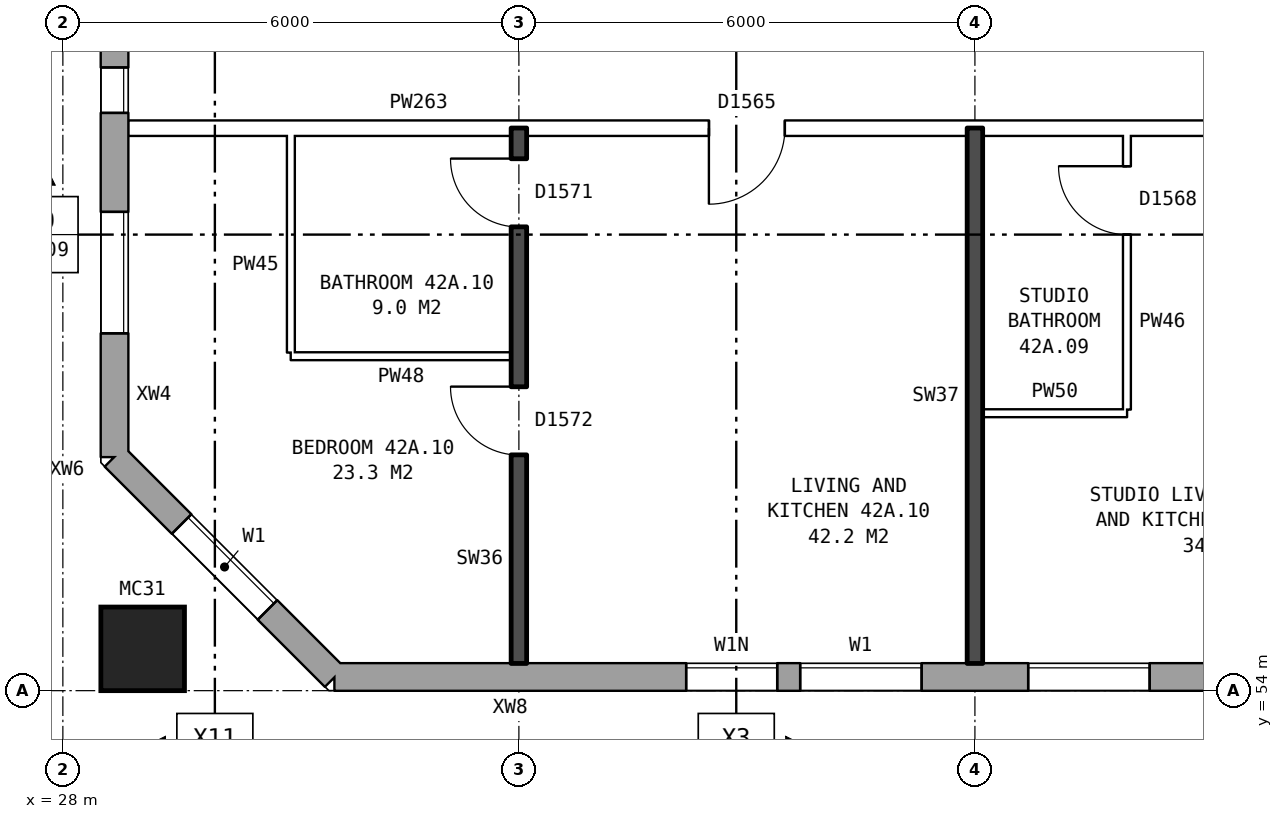
"""IFC4 building model, lengths in metres.
Left out: names, types, materials, properties, quantities, classifications, styles, units other than length and angle.
Written with IfcOpenShell. Run it as: python <this file> out.ifc"""

import sys

from ifc_helpers import new_model, si_unit, direction, frame, frame_2d, origin, origin_2d, place, context, subcontext, project, spatial, rectangle, hollow_rectangle, extrude, element, fill, save


model = new_model("IFC4")
c1 = context("Model", 3, precision=1e-05, world=origin(), true_north=direction((0.0, 1.0)))
c2 = subcontext(c1, "Body", "Model", "MODEL_VIEW")
j1 = project(units=[si_unit("LENGTHUNIT", "METRE"), si_unit("PLANEANGLEUNIT", "RADIAN")], contexts=[c1])
p1 = place(None, origin())
s1 = spatial("IfcSite", under=j1, at=p1, CompositionType="ELEMENT")
p2 = place(p1, origin())
s2 = spatial("IfcBuilding", under=s1, at=p2, CompositionType="ELEMENT")
p3 = place(p2, frame((0.0, 0.0, 151.6)))
s3 = spatial("IfcBuildingStorey", under=s2, at=p3, CompositionType="ELEMENT", Elevation=151.6)
p4 = place(p3, frame((29.05, 54.55, 0.0), z_axis=(0.0, 0.0, 1.0), x_axis=(1.0, 0.0, 0.0)))
e1 = element("IfcColumn", 1, at=p4, inside=s3, PredefinedType="COLUMN", context=c2, shape_type="SweptSolid", body=[
    extrude(hollow_rectangle(XDim=1.1, YDim=1.1, WallThickness=0.06, at=origin_2d()), origin(), (0.0, 0.0, 1.0), 3.1),
])
p5 = place(p3, frame((28.68, 57.075, 0.0), z_axis=(0.0, 0.0, 1.0), x_axis=(0.707106781187, -0.707106781187, 0.0)))
e2 = element("IfcWall", 2, at=p5, inside=s3, PredefinedType="STANDARD", context=c2, shape_type="SweptSolid", body=[
    extrude(rectangle(XDim=4.094, YDim=0.36, at=frame_2d((2.047, 0.0))), origin(), (0.0, 0.0, 1.0), 2.85),
])
p6 = place(p5, frame((1.247, 0.0, 0.8)))
e3 = element("IfcOpeningElement", 3, at=p6, cuts=e2, PredefinedType="OPENING", context=c2, shape_type="SweptSolid", body=[
    extrude(rectangle(XDim=1.6, YDim=1.8, at=frame_2d((0.8, 0.9))), frame((0.0, 0.19, 0.0), z_axis=(0.0, -1.0, 0.0), x_axis=(1.0, 0.0, 0.0)), (0.0, 0.0, 1.0), 0.38),
])
p7 = place(p3, frame((31.575, 54.18, 0.0), z_axis=(0.0, 0.0, 1.0), x_axis=(1.0, 0.0, 0.0)))
e4 = element("IfcWall", 4, at=p7, inside=s3, PredefinedType="STANDARD", context=c2, shape_type="SweptSolid", body=[
    extrude(rectangle(XDim=41.351, YDim=0.36, at=frame_2d((20.675, 0.0))), origin(), (0.0, 0.0, 1.0), 2.85),
])
p8 = place(p7, frame((4.625, 0.0, 0.8)))
e5 = element("IfcOpeningElement", 5, at=p8, cuts=e4, PredefinedType="OPENING", context=c2, shape_type="SweptSolid", body=[
    extrude(rectangle(XDim=1.2, YDim=1.2, at=frame_2d((0.6, 0.6))), frame((0.0, 0.19, 0.0), z_axis=(0.0, -1.0, 0.0), x_axis=(1.0, 0.0, 0.0)), (0.0, 0.0, 1.0), 0.38),
])
p9 = place(p7, frame((6.125, 0.0, 0.8)))
e6 = element("IfcOpeningElement", 6, at=p9, cuts=e4, PredefinedType="OPENING", context=c2, shape_type="SweptSolid", body=[
    extrude(rectangle(XDim=1.6, YDim=1.8, at=frame_2d((0.8, 0.9))), frame((0.0, 0.19, 0.0), z_axis=(0.0, -1.0, 0.0), x_axis=(1.0, 0.0, 0.0)), (0.0, 0.0, 1.0), 0.38),
])
p10 = place(p7, frame((9.125, 0.0, 0.8)))
e7 = element("IfcOpeningElement", 7, at=p10, cuts=e4, PredefinedType="OPENING", context=c2, shape_type="SweptSolid", body=[
    extrude(rectangle(XDim=1.6, YDim=1.8, at=frame_2d((0.8, 0.9))), frame((0.0, 0.19, 0.0), z_axis=(0.0, -1.0, 0.0), x_axis=(1.0, 0.0, 0.0)), (0.0, 0.0, 1.0), 0.38),
])
p11 = place(p7, frame((12.125, 0.0, 0.8)))
e8 = element("IfcOpeningElement", 8, at=p11, cuts=e4, PredefinedType="OPENING", context=c2, shape_type="SweptSolid", body=[
    extrude(rectangle(XDim=1.6, YDim=1.8, at=frame_2d((0.8, 0.9))), frame((0.0, 0.19, 0.0), z_axis=(0.0, -1.0, 0.0), x_axis=(1.0, 0.0, 0.0)), (0.0, 0.0, 1.0), 0.38),
])
p12 = place(p7, frame((15.125, 0.0, 0.8)))
e9 = element("IfcOpeningElement", 9, at=p12, cuts=e4, PredefinedType="OPENING", context=c2, shape_type="SweptSolid", body=[
    extrude(rectangle(XDim=1.6, YDim=1.8, at=frame_2d((0.8, 0.9))), frame((0.0, 0.19, 0.0), z_axis=(0.0, -1.0, 0.0), x_axis=(1.0, 0.0, 0.0)), (0.0, 0.0, 1.0), 0.38),
])
p13 = place(p7, frame((18.125, 0.0, 0.8)))
e10 = element("IfcOpeningElement", 10, at=p13, cuts=e4, PredefinedType="OPENING", context=c2, shape_type="SweptSolid", body=[
    extrude(rectangle(XDim=1.6, YDim=1.8, at=frame_2d((0.8, 0.9))), frame((0.0, 0.19, 0.0), z_axis=(0.0, -1.0, 0.0), x_axis=(1.0, 0.0, 0.0)), (0.0, 0.0, 1.0), 0.38),
])
p14 = place(p7, frame((21.125, 0.0, 0.8)))
e11 = element("IfcOpeningElement", 11, at=p14, cuts=e4, PredefinedType="OPENING", context=c2, shape_type="SweptSolid", body=[
    extrude(rectangle(XDim=1.6, YDim=1.8, at=frame_2d((0.8, 0.9))), frame((0.0, 0.19, 0.0), z_axis=(0.0, -1.0, 0.0), x_axis=(1.0, 0.0, 0.0)), (0.0, 0.0, 1.0), 0.38),
])
p15 = place(p7, frame((24.125, 0.0, 0.8)))
e12 = element("IfcOpeningElement", 12, at=p15, cuts=e4, PredefinedType="OPENING", context=c2, shape_type="SweptSolid", body=[
    extrude(rectangle(XDim=1.6, YDim=1.8, at=frame_2d((0.8, 0.9))), frame((0.0, 0.19, 0.0), z_axis=(0.0, -1.0, 0.0), x_axis=(1.0, 0.0, 0.0)), (0.0, 0.0, 1.0), 0.38),
])
p16 = place(p7, frame((27.125, 0.0, 0.8)))
e13 = element("IfcOpeningElement", 13, at=p16, cuts=e4, PredefinedType="OPENING", context=c2, shape_type="SweptSolid", body=[
    extrude(rectangle(XDim=1.6, YDim=1.8, at=frame_2d((0.8, 0.9))), frame((0.0, 0.19, 0.0), z_axis=(0.0, -1.0, 0.0), x_axis=(1.0, 0.0, 0.0)), (0.0, 0.0, 1.0), 0.38),
])
p17 = place(p7, frame((30.125, 0.0, 0.8)))
e14 = element("IfcOpeningElement", 14, at=p17, cuts=e4, PredefinedType="OPENING", context=c2, shape_type="SweptSolid", body=[
    extrude(rectangle(XDim=1.6, YDim=1.8, at=frame_2d((0.8, 0.9))), frame((0.0, 0.19, 0.0), z_axis=(0.0, -1.0, 0.0), x_axis=(1.0, 0.0, 0.0)), (0.0, 0.0, 1.0), 0.38),
])
p18 = place(p7, frame((33.125, 0.0, 0.8)))
e15 = element("IfcOpeningElement", 15, at=p18, cuts=e4, PredefinedType="OPENING", context=c2, shape_type="SweptSolid", body=[
    extrude(rectangle(XDim=1.6, YDim=1.8, at=frame_2d((0.8, 0.9))), frame((0.0, 0.19, 0.0), z_axis=(0.0, -1.0, 0.0), x_axis=(1.0, 0.0, 0.0)), (0.0, 0.0, 1.0), 0.38),
])
p19 = place(p7, frame((35.025, 0.0, 0.8)))
e16 = element("IfcOpeningElement", 16, at=p19, cuts=e4, PredefinedType="OPENING", context=c2, shape_type="SweptSolid", body=[
    extrude(rectangle(XDim=0.8, YDim=1.8, at=frame_2d((0.4, 0.9))), frame((0.0, 0.19, 0.0), z_axis=(0.0, -1.0, 0.0), x_axis=(1.0, 0.0, 0.0)), (0.0, 0.0, 1.0), 0.38),
])
p20 = place(p7, frame((38.625, 0.0, 1.5)))
e17 = element("IfcOpeningElement", 17, at=p20, cuts=e4, PredefinedType="OPENING", context=c2, shape_type="SweptSolid", body=[
    extrude(rectangle(XDim=0.6, YDim=0.9, at=frame_2d((0.3, 0.45))), frame((0.0, 0.19, 0.0), z_axis=(0.0, -1.0, 0.0), x_axis=(1.0, 0.0, 0.0)), (0.0, 0.0, 1.0), 0.38),
])
p21 = place(p7, frame((36.125, 0.0, 0.8)))
e18 = element("IfcOpeningElement", 18, at=p21, cuts=e4, PredefinedType="OPENING", context=c2, shape_type="SweptSolid", body=[
    extrude(rectangle(XDim=1.0, YDim=0.9, at=frame_2d((0.5, 0.45))), frame((0.0, 0.19, 0.0), z_axis=(0.0, -1.0, 0.0), x_axis=(1.0, 0.0, 0.0)), (0.0, 0.0, 1.0), 0.38),
])
p22 = place(p7, frame((39.525, 0.0, 0.8)))
e19 = element("IfcOpeningElement", 19, at=p22, cuts=e4, PredefinedType="OPENING", context=c2, shape_type="SweptSolid", body=[
    extrude(rectangle(XDim=1.4, YDim=1.8, at=frame_2d((0.7, 0.9))), frame((0.0, 0.19, 0.0), z_axis=(0.0, -1.0, 0.0), x_axis=(1.0, 0.0, 0.0)), (0.0, 0.0, 1.0), 0.38),
])
p23 = place(p3, frame((28.68, 82.925, 0.0), z_axis=(0.0, 0.0, 1.0), x_axis=(0.0, -1.0, 0.0)))
e20 = element("IfcWall", 20, at=p23, inside=s3, PredefinedType="STANDARD", context=c2, shape_type="SweptSolid", body=[
    extrude(rectangle(XDim=25.851, YDim=0.36, at=frame_2d((12.925, 0.0))), origin(), (0.0, 0.0, 1.0), 2.85),
])
p24 = place(p23, frame((1.625, 0.0, 0.8)))
e21 = element("IfcOpeningElement", 21, at=p24, cuts=e20, PredefinedType="OPENING", context=c2, shape_type="SweptSolid", body=[
    extrude(rectangle(XDim=1.6, YDim=1.8, at=frame_2d((0.8, 0.9))), frame((0.0, 0.19, 0.0), z_axis=(0.0, -1.0, 0.0), x_axis=(1.0, 0.0, 0.0)), (0.0, 0.0, 1.0), 0.38),
])
p25 = place(p23, frame((4.525, 0.0, 1.7)))
e22 = element("IfcOpeningElement", 22, at=p25, cuts=e20, PredefinedType="OPENING", context=c2, shape_type="SweptSolid", body=[
    extrude(rectangle(XDim=0.6, YDim=0.9, at=frame_2d((0.3, 0.45))), frame((0.0, 0.19, 0.0), z_axis=(0.0, -1.0, 0.0), x_axis=(1.0, 0.0, 0.0)), (0.0, 0.0, 1.0), 0.38),
])
p26 = place(p23, frame((7.625, 0.0, 0.8)))
e23 = element("IfcOpeningElement", 23, at=p26, cuts=e20, PredefinedType="OPENING", context=c2, shape_type="SweptSolid", body=[
    extrude(rectangle(XDim=1.6, YDim=1.8, at=frame_2d((0.8, 0.9))), frame((0.0, 0.19, 0.0), z_axis=(0.0, -1.0, 0.0), x_axis=(1.0, 0.0, 0.0)), (0.0, 0.0, 1.0), 0.38),
])
p27 = place(p23, frame((10.625, 0.0, 0.8)))
e24 = element("IfcOpeningElement", 24, at=p27, cuts=e20, PredefinedType="OPENING", context=c2, shape_type="SweptSolid", body=[
    extrude(rectangle(XDim=1.6, YDim=1.8, at=frame_2d((0.8, 0.9))), frame((0.0, 0.19, 0.0), z_axis=(0.0, -1.0, 0.0), x_axis=(1.0, 0.0, 0.0)), (0.0, 0.0, 1.0), 0.38),
])
p28 = place(p23, frame((13.625, 0.0, 0.8)))
e25 = element("IfcOpeningElement", 25, at=p28, cuts=e20, PredefinedType="OPENING", context=c2, shape_type="SweptSolid", body=[
    extrude(rectangle(XDim=1.6, YDim=1.8, at=frame_2d((0.8, 0.9))), frame((0.0, 0.19, 0.0), z_axis=(0.0, -1.0, 0.0), x_axis=(1.0, 0.0, 0.0)), (0.0, 0.0, 1.0), 0.38),
])
p29 = place(p23, frame((16.625, 0.0, 0.8)))
e26 = element("IfcOpeningElement", 26, at=p29, cuts=e20, PredefinedType="OPENING", context=c2, shape_type="SweptSolid", body=[
    extrude(rectangle(XDim=1.6, YDim=1.8, at=frame_2d((0.8, 0.9))), frame((0.0, 0.19, 0.0), z_axis=(0.0, -1.0, 0.0), x_axis=(1.0, 0.0, 0.0)), (0.0, 0.0, 1.0), 0.38),
])
p30 = place(p23, frame((6.125, 0.0, 0.8)))
e27 = element("IfcOpeningElement", 27, at=p30, cuts=e20, PredefinedType="OPENING", context=c2, shape_type="SweptSolid", body=[
    extrude(rectangle(XDim=1.2, YDim=0.9, at=frame_2d((0.6, 0.45))), frame((0.0, 0.19, 0.0), z_axis=(0.0, -1.0, 0.0), x_axis=(1.0, 0.0, 0.0)), (0.0, 0.0, 1.0), 0.38),
])
p31 = place(p23, frame((22.625, 0.0, 0.8)))
e28 = element("IfcOpeningElement", 28, at=p31, cuts=e20, PredefinedType="OPENING", context=c2, shape_type="SweptSolid", body=[
    extrude(rectangle(XDim=1.6, YDim=1.8, at=frame_2d((0.8, 0.9))), frame((0.0, 0.19, 0.0), z_axis=(0.0, -1.0, 0.0), x_axis=(1.0, 0.0, 0.0)), (0.0, 0.0, 1.0), 0.38),
])
p32 = place(p23, frame((9.525, 0.0, 0.8)))
e29 = element("IfcOpeningElement", 29, at=p32, cuts=e20, PredefinedType="OPENING", context=c2, shape_type="SweptSolid", body=[
    extrude(rectangle(XDim=0.8, YDim=1.8, at=frame_2d((0.4, 0.9))), frame((0.0, 0.19, 0.0), z_axis=(0.0, -1.0, 0.0), x_axis=(1.0, 0.0, 0.0)), (0.0, 0.0, 1.0), 0.38),
])
p33 = place(p23, frame((12.525, 0.0, 0.8)))
e30 = element("IfcOpeningElement", 30, at=p33, cuts=e20, PredefinedType="OPENING", context=c2, shape_type="SweptSolid", body=[
    extrude(rectangle(XDim=0.8, YDim=1.8, at=frame_2d((0.4, 0.9))), frame((0.0, 0.19, 0.0), z_axis=(0.0, -1.0, 0.0), x_axis=(1.0, 0.0, 0.0)), (0.0, 0.0, 1.0), 0.38),
])
p34 = place(p23, frame((15.525, 0.0, 0.8)))
e31 = element("IfcOpeningElement", 31, at=p34, cuts=e20, PredefinedType="OPENING", context=c2, shape_type="SweptSolid", body=[
    extrude(rectangle(XDim=0.8, YDim=1.8, at=frame_2d((0.4, 0.9))), frame((0.0, 0.19, 0.0), z_axis=(0.0, -1.0, 0.0), x_axis=(1.0, 0.0, 0.0)), (0.0, 0.0, 1.0), 0.38),
])
p35 = place(p23, frame((18.525, 0.0, 0.8)))
e32 = element("IfcOpeningElement", 32, at=p35, cuts=e20, PredefinedType="OPENING", context=c2, shape_type="SweptSolid", body=[
    extrude(rectangle(XDim=1.0, YDim=0.9, at=frame_2d((0.5, 0.45))), frame((0.0, 0.19, 0.0), z_axis=(0.0, -1.0, 0.0), x_axis=(1.0, 0.0, 0.0)), (0.0, 0.0, 1.0), 0.38),
])
p36 = place(p23, frame((20.725, 0.0, 1.7)))
e33 = element("IfcOpeningElement", 33, at=p36, cuts=e20, PredefinedType="OPENING", context=c2, shape_type="SweptSolid", body=[
    extrude(rectangle(XDim=0.6, YDim=0.9, at=frame_2d((0.3, 0.45))), frame((0.0, 0.19, 0.0), z_axis=(0.0, -1.0, 0.0), x_axis=(1.0, 0.0, 0.0)), (0.0, 0.0, 1.0), 0.38),
])
p37 = place(p3, frame((40.1, 57.65, 0.0), z_axis=(0.0, 0.0, 1.0), x_axis=(1.0, 0.0, 0.0)))
e34 = element("IfcWall", 34, at=p37, inside=s3, PredefinedType="PARTITIONING", context=c2, shape_type="SweptSolid", body=[
    extrude(rectangle(XDim=1.9, YDim=0.1, at=frame_2d((0.95, 0.0))), origin(), (0.0, 0.0, 1.0), 2.85),
])
p38 = place(p3, frame((31.0, 58.4, 0.0), z_axis=(0.0, 0.0, 1.0), x_axis=(1.0, 0.0, 0.0)))
e35 = element("IfcWall", 35, at=p38, inside=s3, PredefinedType="PARTITIONING", context=c2, shape_type="SweptSolid", body=[
    extrude(rectangle(XDim=2.9, YDim=0.1, at=frame_2d((1.45, 0.0))), origin(), (0.0, 0.0, 1.0), 2.85),
])
p39 = place(p3, frame((28.86, 61.4, 0.0), z_axis=(0.0, 0.0, 1.0), x_axis=(1.0, 0.0, 0.0)))
e36 = element("IfcWall", 36, at=p39, inside=s3, PredefinedType="PARTITIONING", context=c2, shape_type="SweptSolid", body=[
    extrude(rectangle(XDim=17.04, YDim=0.2, at=frame_2d((8.52, 0.0))), origin(), (0.0, 0.0, 1.0), 2.85),
])
p40 = place(p39, frame((14.59, 0.0, 0.0)))
e37 = element("IfcOpeningElement", 37, at=p40, cuts=e36, PredefinedType="OPENING", context=c2, shape_type="SweptSolid", body=[
    extrude(rectangle(XDim=1.0, YDim=2.1, at=frame_2d((0.5, 1.05))), frame((0.0, 0.11, 0.0), z_axis=(0.0, -1.0, 0.0), x_axis=(1.0, 0.0, 0.0)), (0.0, 0.0, 1.0), 0.22),
])
p41 = place(p39, frame((7.64, 0.0, 0.0)))
e38 = element("IfcOpeningElement", 38, at=p41, cuts=e36, PredefinedType="OPENING", context=c2, shape_type="SweptSolid", body=[
    extrude(rectangle(XDim=1.0, YDim=2.1, at=frame_2d((0.5, 1.05))), frame((0.0, 0.11, 0.0), z_axis=(0.0, -1.0, 0.0), x_axis=(1.0, 0.0, 0.0)), (0.0, 0.0, 1.0), 0.22),
])
p42 = place(p3, frame((31.0, 58.45, 0.0), z_axis=(0.0, 0.0, 1.0), x_axis=(0.0, 1.0, 0.0)))
e39 = element("IfcWall", 39, at=p42, inside=s3, PredefinedType="PARTITIONING", context=c2, shape_type="SweptSolid", body=[
    extrude(rectangle(XDim=2.85, YDim=0.1, at=frame_2d((1.425, 0.0))), origin(), (0.0, 0.0, 1.0), 2.85),
])
p43 = place(p3, frame((34.0, 54.36, 0.0), z_axis=(0.0, 0.0, 1.0), x_axis=(0.0, 1.0, 0.0)))
e40 = element("IfcWall", 40, at=p43, inside=s3, PredefinedType="SOLIDWALL", context=c2, shape_type="SweptSolid", body=[
    extrude(rectangle(XDim=7.04, YDim=0.2, at=frame_2d((3.52, 0.0))), origin(), (0.0, 0.0, 1.0), 2.85),
])
p44 = place(p43, frame((2.74, 0.0, 0.0)))
e41 = element("IfcOpeningElement", 41, at=p44, cuts=e40, PredefinedType="OPENING", context=c2, shape_type="SweptSolid", body=[
    extrude(rectangle(XDim=0.9, YDim=2.1, at=frame_2d((0.45, 1.05))), frame((0.0, 0.11, 0.0), z_axis=(0.0, -1.0, 0.0), x_axis=(1.0, 0.0, 0.0)), (0.0, 0.0, 1.0), 0.22),
])
p45 = place(p43, frame((5.74, 0.0, 0.0)))
e42 = element("IfcOpeningElement", 42, at=p45, cuts=e40, PredefinedType="OPENING", context=c2, shape_type="SweptSolid", body=[
    extrude(rectangle(XDim=0.9, YDim=2.1, at=frame_2d((0.45, 1.05))), frame((0.0, 0.11, 0.0), z_axis=(0.0, -1.0, 0.0), x_axis=(1.0, 0.0, 0.0)), (0.0, 0.0, 1.0), 0.22),
])
p46 = place(p3, frame((40.0, 54.36, 0.0), z_axis=(0.0, 0.0, 1.0), x_axis=(0.0, 1.0, 0.0)))
e43 = element("IfcWall", 43, at=p46, inside=s3, PredefinedType="SOLIDWALL", context=c2, shape_type="SweptSolid", body=[
    extrude(rectangle(XDim=7.04, YDim=0.2, at=frame_2d((3.52, 0.0))), origin(), (0.0, 0.0, 1.0), 2.85),
])
p47 = place(p3, frame((42.0, 57.7, 0.0), z_axis=(0.0, 0.0, 1.0), x_axis=(0.0, 1.0, 0.0)))
e44 = element("IfcWall", 44, at=p47, inside=s3, PredefinedType="PARTITIONING", context=c2, shape_type="SweptSolid", body=[
    extrude(rectangle(XDim=3.6, YDim=0.1, at=frame_2d((1.8, 0.0))), origin(), (0.0, 0.0, 1.0), 2.85),
])
p48 = place(p47, frame((2.3, 0.0, 0.0)))
e45 = element("IfcOpeningElement", 45, at=p48, cuts=e44, PredefinedType="OPENING", context=c2, shape_type="SweptSolid", body=[
    extrude(rectangle(XDim=0.9, YDim=2.1, at=frame_2d((0.45, 1.05))), frame((0.0, 0.06, 0.0), z_axis=(0.0, -1.0, 0.0), x_axis=(1.0, 0.0, 0.0)), (0.0, 0.0, 1.0), 0.12),
])
p49 = place(p6, origin())
e46 = element("IfcWindow", 46, at=p49, inside=s3, PartitioningType="SINGLE_PANEL", PredefinedType="WINDOW", context=c2, shape_type="SweptSolid", body=[
    extrude(rectangle(XDim=1.6, YDim=1.8, at=frame_2d((0.8, 0.9))), frame((0.0, 0.15, 0.0), z_axis=(0.0, -1.0, 0.0), x_axis=(1.0, 0.0, 0.0)), (0.0, 0.0, 1.0), 0.06),
])
fill(e3, e46)
p50 = place(p8, origin())
e47 = element("IfcWindow", 47, at=p50, inside=s3, PartitioningType="SINGLE_PANEL", PredefinedType="WINDOW", context=c2, shape_type="SweptSolid", body=[
    extrude(rectangle(XDim=1.2, YDim=1.2, at=frame_2d((0.6, 0.6))), frame((0.0, 0.15, 0.0), z_axis=(0.0, -1.0, 0.0), x_axis=(1.0, 0.0, 0.0)), (0.0, 0.0, 1.0), 0.06),
])
fill(e5, e47)
p51 = place(p9, origin())
e48 = element("IfcWindow", 48, at=p51, inside=s3, PartitioningType="SINGLE_PANEL", PredefinedType="WINDOW", context=c2, shape_type="SweptSolid", body=[
    extrude(rectangle(XDim=1.6, YDim=1.8, at=frame_2d((0.8, 0.9))), frame((0.0, 0.15, 0.0), z_axis=(0.0, -1.0, 0.0), x_axis=(1.0, 0.0, 0.0)), (0.0, 0.0, 1.0), 0.06),
])
fill(e6, e48)
p52 = place(p10, origin())
e49 = element("IfcWindow", 49, at=p52, inside=s3, PartitioningType="SINGLE_PANEL", PredefinedType="WINDOW", context=c2, shape_type="SweptSolid", body=[
    extrude(rectangle(XDim=1.6, YDim=1.8, at=frame_2d((0.8, 0.9))), frame((0.0, 0.15, 0.0), z_axis=(0.0, -1.0, 0.0), x_axis=(1.0, 0.0, 0.0)), (0.0, 0.0, 1.0), 0.06),
])
fill(e7, e49)
p53 = place(p31, origin())
e50 = element("IfcWindow", 50, at=p53, inside=s3, PartitioningType="SINGLE_PANEL", PredefinedType="WINDOW", context=c2, shape_type="SweptSolid", body=[
    extrude(rectangle(XDim=1.6, YDim=1.8, at=frame_2d((0.8, 0.9))), frame((0.0, 0.15, 0.0), z_axis=(0.0, -1.0, 0.0), x_axis=(1.0, 0.0, 0.0)), (0.0, 0.0, 1.0), 0.06),
])
fill(e28, e50)
p54 = place(p48, origin())
e51 = element("IfcDoor", 51, at=p54, inside=s3, OperationType="SINGLE_SWING_RIGHT", PredefinedType="DOOR", context=c2, shape_type="SweptSolid", body=[
    extrude(rectangle(XDim=0.9, YDim=2.1, at=frame_2d((0.45, 1.05))), frame((0.0, 0.025, 0.0), z_axis=(0.0, -1.0, 0.0), x_axis=(1.0, 0.0, 0.0)), (0.0, 0.0, 1.0), 0.05),
])
fill(e45, e51)
p55 = place(p44, origin())
e52 = element("IfcDoor", 52, at=p55, inside=s3, OperationType="SINGLE_SWING_RIGHT", PredefinedType="DOOR", context=c2, shape_type="SweptSolid", body=[
    extrude(rectangle(XDim=0.9, YDim=2.1, at=frame_2d((0.45, 1.05))), frame((0.0, 0.025, 0.0), z_axis=(0.0, -1.0, 0.0), x_axis=(1.0, 0.0, 0.0)), (0.0, 0.0, 1.0), 0.05),
])
fill(e41, e52)
p56 = place(p41, frame((1.0, 0.0, 0.0), z_axis=(0.0, 0.0, 1.0), x_axis=(-1.0, 0.0, 0.0)))
e53 = element("IfcDoor", 53, at=p56, inside=s3, OperationType="SINGLE_SWING_RIGHT", PredefinedType="DOOR", context=c2, shape_type="SweptSolid", body=[
    extrude(rectangle(XDim=1.0, YDim=2.1, at=frame_2d((0.5, 1.05))), frame((0.0, 0.025, 0.0), z_axis=(0.0, -1.0, 0.0), x_axis=(1.0, 0.0, 0.0)), (0.0, 0.0, 1.0), 0.05),
])
fill(e38, e53)
p57 = place(p45, origin())
e54 = element("IfcDoor", 54, at=p57, inside=s3, OperationType="SINGLE_SWING_RIGHT", PredefinedType="DOOR", context=c2, shape_type="SweptSolid", body=[
    extrude(rectangle(XDim=0.9, YDim=2.1, at=frame_2d((0.45, 1.05))), frame((0.0, 0.025, 0.0), z_axis=(0.0, -1.0, 0.0), x_axis=(1.0, 0.0, 0.0)), (0.0, 0.0, 1.0), 0.05),
])
fill(e42, e54)
p58 = place(p36, origin())
e55 = element("IfcWindow", 55, at=p58, inside=s3, PartitioningType="SINGLE_PANEL", PredefinedType="WINDOW", context=c2, shape_type="SweptSolid", body=[
    extrude(rectangle(XDim=0.6, YDim=0.9, at=frame_2d((0.3, 0.45))), frame((0.0, 0.15, 0.0), z_axis=(0.0, -1.0, 0.0), x_axis=(1.0, 0.0, 0.0)), (0.0, 0.0, 1.0), 0.06),
])
fill(e33, e55)
save(model, sys.argv[1])
